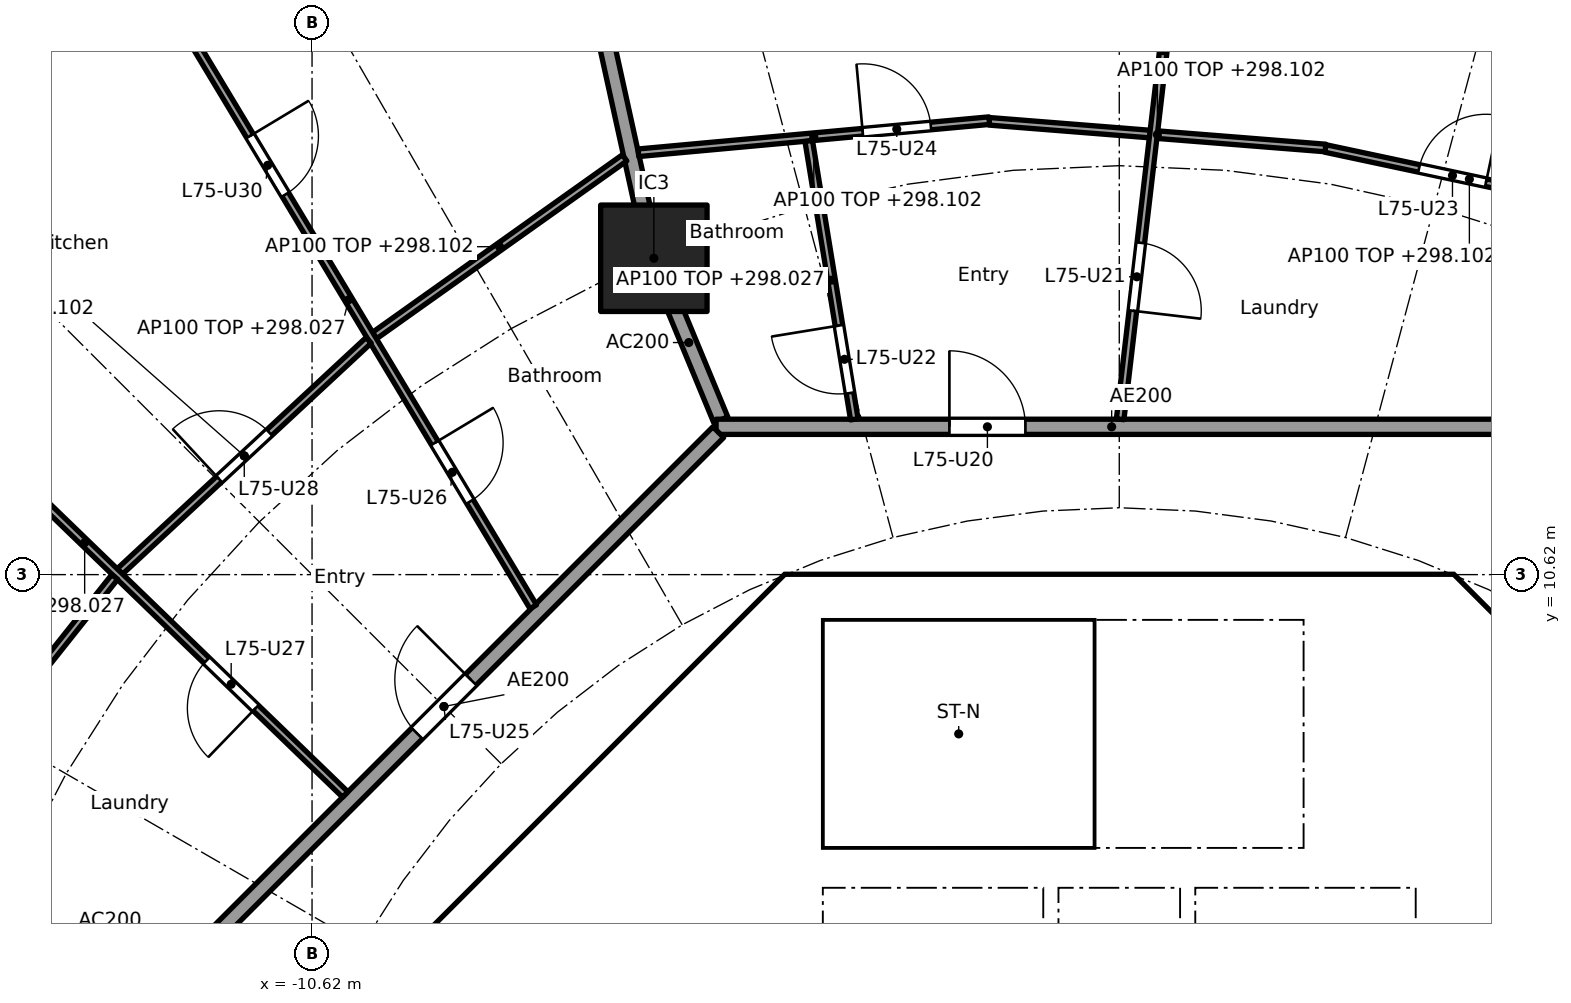
"""IFC4 building model, lengths in metres.
Left out: names, types, materials, properties, quantities, classifications, styles, units other than length and angle.
Written with IfcOpenShell. Run it as: python <this file> out.ifc"""

import sys

from ifc_helpers import new_model, si_unit, direction, frame, frame_2d, origin, origin_2d, place, context, subcontext, project, spatial, polyline, rectangle, outline, extrude, element, fill, save


model = new_model("IFC4")
c1 = context("Model", 3, precision=1e-05, world=origin(), true_north=direction((0.0, 1.0)))
c2 = subcontext(c1, "Body", "Model", "MODEL_VIEW")
j1 = project(units=[si_unit("LENGTHUNIT", "METRE"), si_unit("PLANEANGLEUNIT", "RADIAN")], contexts=[c1])
p1 = place(None, origin())
s1 = spatial("IfcSite", under=j1, at=p1, CompositionType="ELEMENT")
p2 = place(p1, origin())
s2 = spatial("IfcBuilding", under=s1, at=p2, CompositionType="ELEMENT")
p3 = place(p2, frame((0.0, 0.0, 295.5)))
s3 = spatial("IfcBuildingStorey", under=s2, at=p3, CompositionType="ELEMENT", Elevation=295.5)
p4 = place(p3, frame((-6.123, 14.782, 0.0), z_axis=(0.0, 0.0, 1.0), x_axis=(1.0, 0.0, 0.0)))
e1 = element("IfcColumn", 1, at=p4, inside=s3, PredefinedType="COLUMN", context=c2, shape_type="SweptSolid", body=[
    extrude(rectangle(XDim=1.4, YDim=1.4, at=origin_2d()), origin(), (0.0, 0.0, 1.0), 3.7),
])
p5 = place(p3, frame((9.988, 4.613, 0.0), z_axis=(0.0, 0.0, 1.0), x_axis=(-0.707106781187, 0.707106781187, 0.0)))
e2 = element("IfcWall", 2, at=p5, inside=s3, PredefinedType="SHEAR", context=c2, shape_type="SweptSolid", body=[
    extrude(rectangle(XDim=7.602, YDim=0.6, at=frame_2d((3.801, 0.0))), origin(), (0.0, 0.0, 1.0), 3.28),
])
p6 = place(p5, frame((3.201, 0.0, 0.0)))
e3 = element("IfcOpeningElement", 3, at=p6, cuts=e2, PredefinedType="OPENING", context=c2, shape_type="SweptSolid", body=[
    extrude(rectangle(XDim=1.2, YDim=2.1, at=frame_2d((0.6, 1.05))), frame((0.0, 0.31, 0.0), z_axis=(0.0, -1.0, 0.0), x_axis=(1.0, 0.0, 0.0)), (0.0, 0.0, 1.0), 0.62),
])
p7 = place(p3, frame((-4.613, 9.988, 0.0), z_axis=(0.0, 0.0, 1.0), x_axis=(-0.707106781187, -0.707106781187, 0.0)))
e4 = element("IfcWall", 4, at=p7, inside=s3, PredefinedType="SHEAR", context=c2, shape_type="SweptSolid", body=[
    extrude(rectangle(XDim=7.602, YDim=0.6, at=frame_2d((3.801, 0.0))), origin(), (0.0, 0.0, 1.0), 3.28),
])
p8 = place(p7, frame((0.351, 0.0, 0.0)))
e5 = element("IfcOpeningElement", 5, at=p8, cuts=e4, PredefinedType="OPENING", context=c2, shape_type="SweptSolid", body=[
    extrude(rectangle(XDim=1.1, YDim=2.1, at=frame_2d((0.55, 1.05))), frame((0.0, 0.31, 0.0), z_axis=(0.0, -1.0, 0.0), x_axis=(1.0, 0.0, 0.0)), (0.0, 0.0, 1.0), 0.62),
])
p9 = place(p3, frame((-5.8, 4.3, 0.0), z_axis=(0.0, 0.0, 1.0), x_axis=(0.0, 1.0, 0.0)))
e6 = element("IfcWall", 6, at=p9, inside=s3, PredefinedType="PARTITIONING", context=c2, shape_type="SweptSolid", body=[
    extrude(rectangle(XDim=3.927, YDim=0.15, at=frame_2d((1.963, 0.0))), origin(), (0.0, 0.0, 1.0), 3.28),
])
p10 = place(p9, frame((1.551, 0.0, 0.0)))
e7 = element("IfcOpeningElement", 7, at=p10, cuts=e6, PredefinedType="OPENING", context=c2, shape_type="SweptSolid", body=[
    extrude(rectangle(XDim=0.9, YDim=2.1, at=frame_2d((0.45, 1.05))), frame((0.0, 0.085, 0.0), z_axis=(0.0, -1.0, 0.0), x_axis=(1.0, 0.0, 0.0)), (0.0, 0.0, 1.0), 0.17),
])
p11 = place(p3, frame((4.0, 4.3, 0.0), z_axis=(0.0, 0.0, 1.0), x_axis=(0.0, 1.0, 0.0)))
e8 = element("IfcWall", 8, at=p11, inside=s3, PredefinedType="SOLIDWALL", context=c2, shape_type="SweptSolid", body=[
    extrude(rectangle(XDim=2.2, YDim=0.2, at=frame_2d((1.1, 0.0))), origin(), (0.0, 0.0, 1.0), 3.28),
])
p12 = place(p11, frame((0.55, 0.0, 0.0)))
e9 = element("IfcOpeningElement", 9, at=p12, cuts=e8, PredefinedType="OPENING", context=c2, shape_type="SweptSolid", body=[
    extrude(rectangle(XDim=1.1, YDim=2.1, at=frame_2d((0.55, 1.05))), frame((0.0, 0.11, 0.0), z_axis=(0.0, -1.0, 0.0), x_axis=(1.0, 0.0, 0.0)), (0.0, 0.0, 1.0), 0.22),
])
p13 = place(p3, frame((-4.0, 4.3, 0.0), z_axis=(0.0, 0.0, 1.0), x_axis=(0.0, 1.0, 0.0)))
e10 = element("IfcWall", 10, at=p13, inside=s3, PredefinedType="SOLIDWALL", context=c2, shape_type="SweptSolid", body=[
    extrude(rectangle(XDim=2.2, YDim=0.2, at=frame_2d((1.1, 0.0))), origin(), (0.0, 0.0, 1.0), 3.28),
])
p14 = place(p13, frame((0.55, 0.0, 0.0)))
e11 = element("IfcOpeningElement", 11, at=p14, cuts=e10, PredefinedType="OPENING", context=c2, shape_type="SweptSolid", body=[
    extrude(rectangle(XDim=1.1, YDim=2.1, at=frame_2d((0.55, 1.05))), frame((0.0, 0.11, 0.0), z_axis=(0.0, -1.0, 0.0), x_axis=(1.0, 0.0, 0.0)), (0.0, 0.0, 1.0), 0.22),
])
p15 = place(p3, frame((4.0, 7.025, 0.0), z_axis=(0.0, 0.0, 1.0), x_axis=(0.0, 1.0, 0.0)))
e12 = element("IfcWall", 12, at=p15, inside=s3, PredefinedType="SOLIDWALL", context=c2, shape_type="SweptSolid", body=[
    extrude(rectangle(XDim=3.0, YDim=0.2, at=frame_2d((1.5, 0.0))), origin(), (0.0, 0.0, 1.0), 3.28),
])
p16 = place(p15, frame((0.925, 0.0, 0.0)))
e13 = element("IfcOpeningElement", 13, at=p16, cuts=e12, PredefinedType="OPENING", context=c2, shape_type="SweptSolid", body=[
    extrude(rectangle(XDim=1.1, YDim=2.1, at=frame_2d((0.55, 1.05))), frame((0.0, 0.11, 0.0), z_axis=(0.0, -1.0, 0.0), x_axis=(1.0, 0.0, 0.0)), (0.0, 0.0, 1.0), 0.22),
])
p17 = place(p3, origin())
e14 = element("IfcWall", 14, at=p17, inside=s3, PredefinedType="SHEAR", context=c2, shape_type="SweptSolid", body=[
    extrude(outline(polyline([(-4.152, 10.025), (-4.401, 9.776), (-4.825, 10.2), (-4.401, 10.625), (4.401, 10.625), (4.825, 10.2), (4.401, 9.776), (4.152, 10.025), (-4.152, 10.025)])), origin(), (0.0, 0.0, 1.0), 3.28),
])
for number, where, z_axis, x_axis in (
    (15, (-0.9, 4.3, 0.0), (0.0, 0.0, 1.0), (0.0, 1.0, 0.0)),
    (16, (0.9, 4.3, 0.0), (0.0, 0.0, 1.0), (0.0, 1.0, 0.0)),
):
    element("IfcWall", number, at=place(p3, frame(where, z_axis=z_axis, x_axis=x_axis)), inside=s3, PredefinedType="SOLIDWALL", context=c2, shape_type="SweptSolid", body=[
        extrude(rectangle(XDim=2.2, YDim=0.2, at=frame_2d((1.1, 0.0))), origin(), (0.0, 0.0, 1.0), 3.28),
    ])
p18 = place(p3, origin())
e17 = element("IfcWall", 17, at=p18, inside=s3, PredefinedType="SOLIDWALL", context=c2, shape_type="SweptSolid", body=[
    extrude(outline(polyline([(-3.9, 7.025), (-4.1, 7.025), (-4.1, 10.025), (-3.9, 10.025), (-3.9, 7.025)])), origin(), (0.0, 0.0, 1.0), 3.28),
])
p19 = place(p3, origin())
e18 = element("IfcWall", 18, at=p19, inside=s3, PredefinedType="SOLIDWALL", context=c2, shape_type="SweptSolid", body=[
    extrude(outline(polyline([(4.1, 6.5), (-4.1, 6.5), (-4.1, 7.025), (4.1, 7.025), (4.1, 6.5)])), origin(), (0.0, 0.0, 1.0), 3.28),
])
p20 = place(p3, frame((-5.243, 12.657, 0.0), z_axis=(0.0, 0.0, 1.0), x_axis=(-0.38273085373, 0.923859888513, 0.0)))
e19 = element("IfcWall", 19, at=p20, inside=s3, PredefinedType="PARTITIONING", context=c2, shape_type="SweptSolid", body=[
    extrude(rectangle(XDim=2.199, YDim=0.2, at=frame_2d((1.1, 0.0))), origin(), (0.0, 0.0, 1.0), 3.28),
])
p21 = place(p3, frame((-6.134, 14.831, 0.0), z_axis=(0.0, 0.0, 1.0), x_axis=(-0.214842475666, 0.976648714047, 0.0)))
e20 = element("IfcWall", 20, at=p21, inside=s3, PredefinedType="PARTITIONING", context=c2, shape_type="SweptSolid", body=[
    extrude(rectangle(XDim=6.031, YDim=0.2, at=frame_2d((3.015, 0.0))), origin(), (0.0, 0.0, 1.0), 2.602),
])
p22 = place(p3, frame((-12.657, 5.243, 0.0), z_axis=(0.0, 0.0, 1.0), x_axis=(-0.923869415315, 0.382707856524, 0.0)))
e21 = element("IfcWall", 21, at=p22, inside=s3, PredefinedType="PARTITIONING", context=c2, shape_type="SweptSolid", body=[
    extrude(rectangle(XDim=2.2, YDim=0.2, at=frame_2d((1.1, 0.0))), origin(), (0.0, 0.0, 1.0), 3.28),
])
p23 = place(p3, frame((5.104, 12.565, 0.0), z_axis=(0.0, 0.0, 1.0), x_axis=(-1.0, 0.0, 0.0)))
e22 = element("IfcWall", 22, at=p23, inside=s3, PredefinedType="PARTITIONING", context=c2, shape_type="SweptSolid", body=[
    extrude(rectangle(XDim=10.409, YDim=0.2, at=frame_2d((5.205, 0.0))), origin(), (0.0, 0.0, 1.0), 3.28),
])
p24 = place(p23, frame((6.339, 0.0, 0.0)))
e23 = element("IfcOpeningElement", 23, at=p24, cuts=e22, PredefinedType="OPENING", context=c2, shape_type="SweptSolid", body=[
    extrude(rectangle(XDim=1.0, YDim=2.1, at=frame_2d((0.5, 1.05))), frame((0.0, 0.11, 0.0), z_axis=(0.0, -1.0, 0.0), x_axis=(1.0, 0.0, 0.0)), (0.0, 0.0, 1.0), 0.22),
])
p25 = place(p3, frame((-5.275, 12.494, 0.0), z_axis=(0.0, 0.0, 1.0), x_axis=(-0.707106781187, -0.707106781187, 0.0)))
e24 = element("IfcWall", 24, at=p25, inside=s3, PredefinedType="PARTITIONING", context=c2, shape_type="SweptSolid", body=[
    extrude(rectangle(XDim=10.209, YDim=0.2, at=frame_2d((5.104, 0.0))), origin(), (0.0, 0.0, 1.0), 3.28),
])
p26 = place(p25, frame((4.604, 0.0, 0.0)))
e25 = element("IfcOpeningElement", 25, at=p26, cuts=e24, PredefinedType="OPENING", context=c2, shape_type="SweptSolid", body=[
    extrude(rectangle(XDim=1.0, YDim=2.1, at=frame_2d((0.5, 1.05))), frame((0.0, 0.11, 0.0), z_axis=(0.0, -1.0, 0.0), x_axis=(1.0, 0.0, 0.0)), (0.0, 0.0, 1.0), 0.22),
])
p27 = place(p3, frame((6.5, 15.419, 0.0), z_axis=(0.0, 0.0, 1.0), x_axis=(-0.978053492557, 0.208353943321, 0.0)))
e26 = element("IfcWall", 26, at=p27, inside=s3, PredefinedType="PARTITIONING", context=c2, shape_type="SweptSolid", body=[
    extrude(rectangle(XDim=3.874, YDim=0.1, at=frame_2d((1.937, 0.0))), origin(), (0.0, 0.0, 1.0), 2.602),
])
p28 = place(p27, frame((1.714, 0.0, 0.0)))
e27 = element("IfcOpeningElement", 27, at=p28, cuts=e26, PredefinedType="OPENING", context=c2, shape_type="SweptSolid", body=[
    extrude(rectangle(XDim=0.9, YDim=2.1, at=frame_2d((0.45, 1.05))), frame((0.0, 0.06, 0.0), z_axis=(0.0, -1.0, 0.0), x_axis=(1.0, 0.0, 0.0)), (0.0, 0.0, 1.0), 0.12),
])
p29 = place(p3, frame((2.713, 16.233, 0.0), z_axis=(0.0, 0.0, 1.0), x_axis=(-0.996870142942, 0.079056423588, 0.0)))
e28 = element("IfcWall", 28, at=p29, inside=s3, PredefinedType="PARTITIONING", context=c2, shape_type="SweptSolid", body=[
    extrude(rectangle(XDim=4.438, YDim=0.1, at=frame_2d((2.219, 0.0))), origin(), (0.0, 0.0, 1.0), 2.602),
])
p30 = place(p3, frame((0.012, 12.664, 0.0), z_axis=(0.0, 0.0, 1.0), x_axis=(0.11636251357, 0.993206808996, 0.0)))
e29 = element("IfcWall", 29, at=p30, inside=s3, PredefinedType="PARTITIONING", context=c2, shape_type="SweptSolid", body=[
    extrude(rectangle(XDim=9.765, YDim=0.1, at=frame_2d((4.882, 0.0))), origin(), (0.0, 0.0, 1.0), 2.527),
])
p31 = place(p30, frame((1.437, 0.0, 0.0)))
e30 = element("IfcOpeningElement", 30, at=p31, cuts=e29, PredefinedType="OPENING", context=c2, shape_type="SweptSolid", body=[
    extrude(rectangle(XDim=0.9, YDim=2.1, at=frame_2d((0.45, 1.05))), frame((0.0, 0.06, 0.0), z_axis=(0.0, -1.0, 0.0), x_axis=(1.0, 0.0, 0.0)), (0.0, 0.0, 1.0), 0.12),
])
p32 = place(p3, frame((-1.711, 16.592, 0.0), z_axis=(0.0, 0.0, 1.0), x_axis=(-0.995843837247, -0.091077175065, 0.0)))
e31 = element("IfcWall", 31, at=p32, inside=s3, PredefinedType="PARTITIONING", context=c2, shape_type="SweptSolid", body=[
    extrude(rectangle(XDim=4.635, YDim=0.1, at=frame_2d((2.317, 0.0))), origin(), (0.0, 0.0, 1.0), 2.602),
])
p33 = place(p32, frame((0.771, 0.0, 0.0)))
e32 = element("IfcOpeningElement", 32, at=p33, cuts=e31, PredefinedType="OPENING", context=c2, shape_type="SweptSolid", body=[
    extrude(rectangle(XDim=0.9, YDim=2.1, at=frame_2d((0.45, 1.05))), frame((0.0, 0.06, 0.0), z_axis=(0.0, -1.0, 0.0), x_axis=(1.0, 0.0, 0.0)), (0.0, 0.0, 1.0), 0.12),
])
p34 = place(p3, frame((-3.486, 12.663, 0.0), z_axis=(0.0, 0.0, 1.0), x_axis=(-0.161602751674, 0.986855891532, 0.0)))
e33 = element("IfcWall", 33, at=p34, inside=s3, PredefinedType="PARTITIONING", context=c2, shape_type="SweptSolid", body=[
    extrude(rectangle(XDim=3.71, YDim=0.1, at=frame_2d((1.855, 0.0))), origin(), (0.0, 0.0, 1.0), 2.527),
])
p35 = place(p34, frame((0.35, 0.0, 0.0)))
e34 = element("IfcOpeningElement", 34, at=p35, cuts=e33, PredefinedType="OPENING", context=c2, shape_type="SweptSolid", body=[
    extrude(rectangle(XDim=0.9, YDim=2.1, at=frame_2d((0.45, 1.05))), frame((0.0, 0.06, 0.0), z_axis=(0.0, -1.0, 0.0), x_axis=(1.0, 0.0, 0.0)), (0.0, 0.0, 1.0), 0.12),
])
p36 = place(p3, frame((-6.508, 16.103, 0.0), z_axis=(0.0, 0.0, 1.0), x_axis=(-0.815202203556, -0.579176456114, 0.0)))
e35 = element("IfcWall", 35, at=p36, inside=s3, PredefinedType="PARTITIONING", context=c2, shape_type="SweptSolid", body=[
    extrude(rectangle(XDim=4.036, YDim=0.1, at=frame_2d((2.018, 0.0))), origin(), (0.0, 0.0, 1.0), 2.602),
])
p37 = place(p3, frame((-7.709, 10.197, 0.0), z_axis=(0.0, 0.0, 1.0), x_axis=(-0.515516160663, 0.856879856278, 0.0)))
e36 = element("IfcWall", 36, at=p37, inside=s3, PredefinedType="PARTITIONING", context=c2, shape_type="SweptSolid", body=[
    extrude(rectangle(XDim=9.426, YDim=0.1, at=frame_2d((4.713, 0.0))), origin(), (0.0, 0.0, 1.0), 2.527),
])
p38 = place(p37, frame((1.615, 0.0, 0.0)))
e37 = element("IfcOpeningElement", 37, at=p38, cuts=e36, PredefinedType="OPENING", context=c2, shape_type="SweptSolid", body=[
    extrude(rectangle(XDim=0.9, YDim=2.1, at=frame_2d((0.45, 1.05))), frame((0.0, 0.06, 0.0), z_axis=(0.0, -1.0, 0.0), x_axis=(1.0, 0.0, 0.0)), (0.0, 0.0, 1.0), 0.12),
])
p39 = place(p37, frame((6.328, 0.0, 0.0)))
e38 = element("IfcOpeningElement", 38, at=p39, cuts=e36, PredefinedType="OPENING", context=c2, shape_type="SweptSolid", body=[
    extrude(rectangle(XDim=0.9, YDim=2.1, at=frame_2d((0.45, 1.05))), frame((0.0, 0.06, 0.0), z_axis=(0.0, -1.0, 0.0), x_axis=(1.0, 0.0, 0.0)), (0.0, 0.0, 1.0), 0.12),
])
p40 = place(p3, frame((-9.875, 13.702, 0.0), z_axis=(0.0, 0.0, 1.0), x_axis=(-0.732618266441, -0.680639754699, 0.0)))
e39 = element("IfcWall", 39, at=p40, inside=s3, PredefinedType="PARTITIONING", context=c2, shape_type="SweptSolid", body=[
    extrude(rectangle(XDim=4.467, YDim=0.1, at=frame_2d((2.233, 0.0))), origin(), (0.0, 0.0, 1.0), 2.602),
])
p41 = place(p40, frame((1.783, 0.0, 0.0)))
e40 = element("IfcOpeningElement", 40, at=p41, cuts=e39, PredefinedType="OPENING", context=c2, shape_type="SweptSolid", body=[
    extrude(rectangle(XDim=0.9, YDim=2.1, at=frame_2d((0.45, 1.05))), frame((0.0, 0.06, 0.0), z_axis=(0.0, -1.0, 0.0), x_axis=(1.0, 0.0, 0.0)), (0.0, 0.0, 1.0), 0.12),
])
p42 = place(p3, frame((-10.183, 7.727, 0.0), z_axis=(0.0, 0.0, 1.0), x_axis=(-0.719063433856, 0.694944442449, 0.0)))
e41 = element("IfcWall", 41, at=p42, inside=s3, PredefinedType="PARTITIONING", context=c2, shape_type="SweptSolid", body=[
    extrude(rectangle(XDim=9.535, YDim=0.1, at=frame_2d((4.768, 0.0))), origin(), (0.0, 0.0, 1.0), 2.527),
])
p43 = place(p42, frame((1.637, 0.0, 0.0)))
e42 = element("IfcOpeningElement", 42, at=p43, cuts=e41, PredefinedType="OPENING", context=c2, shape_type="SweptSolid", body=[
    extrude(rectangle(XDim=0.9, YDim=2.1, at=frame_2d((0.45, 1.05))), frame((0.0, 0.06, 0.0), z_axis=(0.0, -1.0, 0.0), x_axis=(1.0, 0.0, 0.0)), (0.0, 0.0, 1.0), 0.12),
])
p44 = place(p42, frame((6.405, 0.0, 0.0)))
e43 = element("IfcOpeningElement", 43, at=p44, cuts=e41, PredefinedType="OPENING", context=c2, shape_type="SweptSolid", body=[
    extrude(rectangle(XDim=0.9, YDim=2.1, at=frame_2d((0.45, 1.05))), frame((0.0, 0.06, 0.0), z_axis=(0.0, -1.0, 0.0), x_axis=(1.0, 0.0, 0.0)), (0.0, 0.0, 1.0), 0.12),
])
p45 = place(p3, frame((-13.216, 10.589, 0.0), z_axis=(0.0, 0.0, 1.0), x_axis=(-0.622251572882, -0.782817335045, 0.0)))
e44 = element("IfcWall", 44, at=p45, inside=s3, PredefinedType="PARTITIONING", context=c2, shape_type="SweptSolid", body=[
    extrude(rectangle(XDim=4.636, YDim=0.1, at=frame_2d((2.318, 0.0))), origin(), (0.0, 0.0, 1.0), 2.602),
])
p46 = place(p16, origin())
e45 = element("IfcDoor", 45, at=p46, inside=s3, OperationType="SINGLE_SWING_RIGHT", PredefinedType="DOOR", context=c2, shape_type="SweptSolid", body=[
    extrude(rectangle(XDim=1.1, YDim=2.1, at=frame_2d((0.55, 1.05))), frame((0.0, 0.025, 0.0), z_axis=(0.0, -1.0, 0.0), x_axis=(1.0, 0.0, 0.0)), (0.0, 0.0, 1.0), 0.05),
])
fill(e13, e45)
p47 = place(p10, origin())
e46 = element("IfcDoor", 46, at=p47, inside=s3, OperationType="SINGLE_SWING_LEFT", PredefinedType="DOOR", context=c2, shape_type="SweptSolid", body=[
    extrude(rectangle(XDim=0.9, YDim=2.1, at=frame_2d((0.45, 1.05))), frame((0.0, 0.025, 0.0), z_axis=(0.0, -1.0, 0.0), x_axis=(1.0, 0.0, 0.0)), (0.0, 0.0, 1.0), 0.05),
])
fill(e7, e46)
p48 = place(p8, origin())
e47 = element("IfcDoor", 47, at=p48, inside=s3, OperationType="SINGLE_SWING_RIGHT", PredefinedType="DOOR", context=c2, shape_type="SweptSolid", body=[
    extrude(rectangle(XDim=1.1, YDim=2.1, at=frame_2d((0.55, 1.05))), frame((0.0, 0.025, 0.0), z_axis=(0.0, -1.0, 0.0), x_axis=(1.0, 0.0, 0.0)), (0.0, 0.0, 1.0), 0.05),
])
fill(e5, e47)
p49 = place(p24, frame((1.0, 0.0, 0.0), x_axis=(-1.0, 0.0, 0.0)))
e48 = element("IfcDoor", 48, at=p49, inside=s3, OperationType="SINGLE_SWING_LEFT", PredefinedType="DOOR", context=c2, shape_type="SweptSolid", body=[
    extrude(rectangle(XDim=1.0, YDim=2.1, at=frame_2d((0.5, 1.05))), frame((0.0, 0.025, 0.0), z_axis=(0.0, -1.0, 0.0), x_axis=(1.0, 0.0, 0.0)), (0.0, 0.0, 1.0), 0.05),
])
fill(e23, e48)
p50 = place(p31, frame((0.9, 0.0, 0.0), x_axis=(-1.0, 0.0, 0.0)))
e49 = element("IfcDoor", 49, at=p50, inside=s3, OperationType="SINGLE_SWING_RIGHT", PredefinedType="DOOR", context=c2, shape_type="SweptSolid", body=[
    extrude(rectangle(XDim=0.9, YDim=2.1, at=frame_2d((0.45, 1.05))), frame((0.0, 0.025, 0.0), z_axis=(0.0, -1.0, 0.0), x_axis=(1.0, 0.0, 0.0)), (0.0, 0.0, 1.0), 0.05),
])
fill(e30, e49)
p51 = place(p35, origin())
e50 = element("IfcDoor", 50, at=p51, inside=s3, OperationType="SINGLE_SWING_RIGHT", PredefinedType="DOOR", context=c2, shape_type="SweptSolid", body=[
    extrude(rectangle(XDim=0.9, YDim=2.1, at=frame_2d((0.45, 1.05))), frame((0.0, 0.025, 0.0), z_axis=(0.0, -1.0, 0.0), x_axis=(1.0, 0.0, 0.0)), (0.0, 0.0, 1.0), 0.05),
])
fill(e34, e50)
p52 = place(p28, frame((0.9, 0.0, 0.0), x_axis=(-1.0, 0.0, 0.0)))
e51 = element("IfcDoor", 51, at=p52, inside=s3, OperationType="SINGLE_SWING_RIGHT", PredefinedType="DOOR", context=c2, shape_type="SweptSolid", body=[
    extrude(rectangle(XDim=0.9, YDim=2.1, at=frame_2d((0.45, 1.05))), frame((0.0, 0.025, 0.0), z_axis=(0.0, -1.0, 0.0), x_axis=(1.0, 0.0, 0.0)), (0.0, 0.0, 1.0), 0.05),
])
fill(e27, e51)
p53 = place(p33, frame((0.9, 0.0, 0.0), x_axis=(-1.0, 0.0, 0.0)))
e52 = element("IfcDoor", 52, at=p53, inside=s3, OperationType="SINGLE_SWING_LEFT", PredefinedType="DOOR", context=c2, shape_type="SweptSolid", body=[
    extrude(rectangle(XDim=0.9, YDim=2.1, at=frame_2d((0.45, 1.05))), frame((0.0, 0.025, 0.0), z_axis=(0.0, -1.0, 0.0), x_axis=(1.0, 0.0, 0.0)), (0.0, 0.0, 1.0), 0.05),
])
fill(e32, e52)
p54 = place(p26, frame((1.0, 0.0, 0.0), x_axis=(-1.0, 0.0, 0.0)))
e53 = element("IfcDoor", 53, at=p54, inside=s3, OperationType="SINGLE_SWING_RIGHT", PredefinedType="DOOR", context=c2, shape_type="SweptSolid", body=[
    extrude(rectangle(XDim=1.0, YDim=2.1, at=frame_2d((0.5, 1.05))), frame((0.0, 0.025, 0.0), z_axis=(0.0, -1.0, 0.0), x_axis=(1.0, 0.0, 0.0)), (0.0, 0.0, 1.0), 0.05),
])
fill(e25, e53)
p55 = place(p38, frame((0.9, 0.0, 0.0), x_axis=(-1.0, 0.0, 0.0)))
e54 = element("IfcDoor", 54, at=p55, inside=s3, OperationType="SINGLE_SWING_LEFT", PredefinedType="DOOR", context=c2, shape_type="SweptSolid", body=[
    extrude(rectangle(XDim=0.9, YDim=2.1, at=frame_2d((0.45, 1.05))), frame((0.0, 0.025, 0.0), z_axis=(0.0, -1.0, 0.0), x_axis=(1.0, 0.0, 0.0)), (0.0, 0.0, 1.0), 0.05),
])
fill(e37, e54)
p56 = place(p43, origin())
e55 = element("IfcDoor", 55, at=p56, inside=s3, OperationType="SINGLE_SWING_LEFT", PredefinedType="DOOR", context=c2, shape_type="SweptSolid", body=[
    extrude(rectangle(XDim=0.9, YDim=2.1, at=frame_2d((0.45, 1.05))), frame((0.0, 0.025, 0.0), z_axis=(0.0, -1.0, 0.0), x_axis=(1.0, 0.0, 0.0)), (0.0, 0.0, 1.0), 0.05),
])
fill(e42, e55)
p57 = place(p41, frame((0.9, 0.0, 0.0), x_axis=(-1.0, 0.0, 0.0)))
e56 = element("IfcDoor", 56, at=p57, inside=s3, OperationType="SINGLE_SWING_LEFT", PredefinedType="DOOR", context=c2, shape_type="SweptSolid", body=[
    extrude(rectangle(XDim=0.9, YDim=2.1, at=frame_2d((0.45, 1.05))), frame((0.0, 0.025, 0.0), z_axis=(0.0, -1.0, 0.0), x_axis=(1.0, 0.0, 0.0)), (0.0, 0.0, 1.0), 0.05),
])
fill(e40, e56)
p58 = place(p39, frame((0.9, 0.0, 0.0), x_axis=(-1.0, 0.0, 0.0)))
e57 = element("IfcDoor", 57, at=p58, inside=s3, OperationType="SINGLE_SWING_LEFT", PredefinedType="DOOR", context=c2, shape_type="SweptSolid", body=[
    extrude(rectangle(XDim=0.9, YDim=2.1, at=frame_2d((0.45, 1.05))), frame((0.0, 0.025, 0.0), z_axis=(0.0, -1.0, 0.0), x_axis=(1.0, 0.0, 0.0)), (0.0, 0.0, 1.0), 0.05),
])
fill(e38, e57)
save(model, sys.argv[1])
